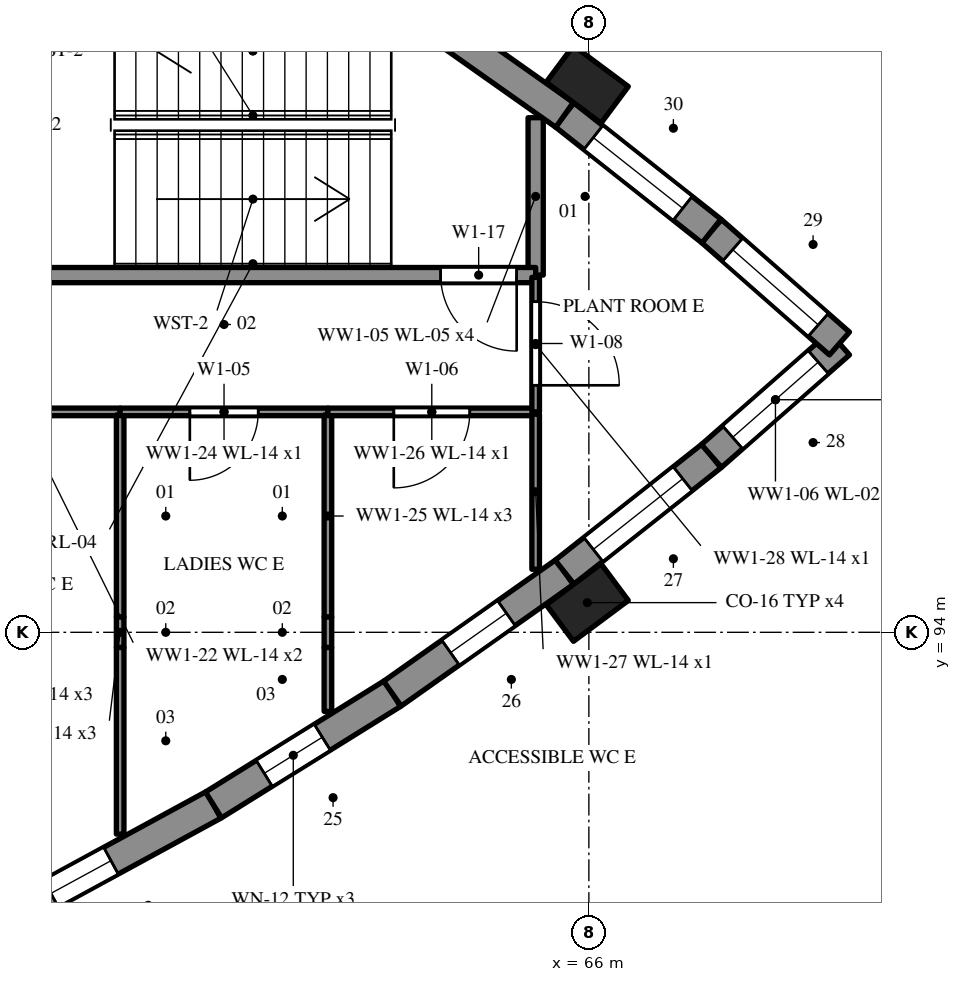
"""IFC4 building model, lengths in metres.
Left out: names, types, materials, properties, quantities, classifications, styles, units other than length and angle.
Written with IfcOpenShell. Run it as: python <this file> out.ifc"""

import sys

from ifc_helpers import new_model, si_unit, direction, frame, frame_2d, origin, origin_2d, place, context, subcontext, project, spatial, rectangle, extrude, element, fill, save


model = new_model("IFC4")
c1 = context("Model", 3, precision=1e-05, world=origin(), true_north=direction((0.0, 1.0)))
c2 = subcontext(c1, "Body", "Model", "MODEL_VIEW")
j1 = project(units=[si_unit("LENGTHUNIT", "METRE"), si_unit("PLANEANGLEUNIT", "RADIAN")], contexts=[c1])
p1 = place(None, origin())
s1 = spatial("IfcSite", under=j1, at=p1, CompositionType="ELEMENT")
p2 = place(p1, origin())
s2 = spatial("IfcBuilding", under=s1, at=p2, CompositionType="ELEMENT")
p3 = place(p2, frame((0.0, 0.0, 5.4)))
s3 = spatial("IfcBuildingStorey", under=s2, at=p3, CompositionType="ELEMENT", Elevation=5.4)
p4 = place(p3, frame((65.3, 100.771, 0.0), z_axis=(0.0, 0.0, 1.0), x_axis=(0.0, -1.0, 0.0)))
e1 = element("IfcWall", 1, at=p4, inside=s3, PredefinedType="SHEAR", context=c2, shape_type="SweptSolid", body=[
    extrude(rectangle(XDim=2.071, YDim=0.2, at=frame_2d((1.035, 0.0))), origin(), (0.0, 0.0, 1.0), 4.8),
])
p5 = place(p3, frame((65.3, 98.7, 0.0), z_axis=(0.0, 0.0, 1.0), x_axis=(-1.0, 0.0, 0.0)))
e2 = element("IfcWall", 2, at=p5, inside=s3, PredefinedType="SHEAR", context=c2, shape_type="SweptSolid", body=[
    extrude(rectangle(XDim=8.2, YDim=0.2, at=frame_2d((4.1, 0.0))), origin(), (0.0, 0.0, 1.0), 4.8),
])
p6 = place(p5, frame((0.25, 0.0, 0.0)))
e3 = element("IfcOpeningElement", 3, at=p6, cuts=e2, PredefinedType="OPENING", context=c2, shape_type="SweptSolid", body=[
    extrude(rectangle(XDim=1.0, YDim=2.4, at=frame_2d((0.5, 1.2))), frame((0.0, 0.11, 0.0), z_axis=(0.0, -1.0, 0.0), x_axis=(1.0, 0.0, 0.0)), (0.0, 0.0, 1.0), 0.22),
])
p7 = place(p3, frame((58.627, 90.404, 0.0), z_axis=(0.0, 0.0, 1.0), x_axis=(0.878292493566, 0.478123724308, 0.0)))
e4 = element("IfcWall", 4, at=p7, inside=s3, PredefinedType="SOLIDWALL", context=c2, shape_type="SweptSolid", body=[
    extrude(rectangle(XDim=2.772, YDim=0.4, at=frame_2d((1.386, 0.0))), origin(), (0.0, 0.0, 1.0), 4.8),
])
p8 = place(p7, frame((0.336, 0.0, 1.6)))
e5 = element("IfcOpeningElement", 5, at=p8, cuts=e4, PredefinedType="OPENING", context=c2, shape_type="SweptSolid", body=[
    extrude(rectangle(XDim=0.9, YDim=0.6, at=frame_2d((0.45, 0.3))), frame((0.0, 0.21, 0.0), z_axis=(0.0, -1.0, 0.0), x_axis=(1.0, 0.0, 0.0)), (0.0, 0.0, 1.0), 0.42),
])
p9 = place(p3, frame((61.062, 91.729, 0.0), z_axis=(0.0, 0.0, 1.0), x_axis=(0.84912946359, 0.528184772653, 0.0)))
e6 = element("IfcWall", 6, at=p9, inside=s3, PredefinedType="SOLIDWALL", context=c2, shape_type="SweptSolid", body=[
    extrude(rectangle(XDim=2.772, YDim=0.4, at=frame_2d((1.386, 0.0))), origin(), (0.0, 0.0, 1.0), 4.8),
])
p10 = place(p9, frame((0.786, 0.0, 1.6)))
e7 = element("IfcOpeningElement", 7, at=p10, cuts=e6, PredefinedType="OPENING", context=c2, shape_type="SweptSolid", body=[
    extrude(rectangle(XDim=0.9, YDim=0.6, at=frame_2d((0.45, 0.3))), frame((0.0, 0.21, 0.0), z_axis=(0.0, -1.0, 0.0), x_axis=(1.0, 0.0, 0.0)), (0.0, 0.0, 1.0), 0.42),
])
p11 = place(p3, frame((63.415, 93.193, 0.0), z_axis=(0.0, 0.0, 1.0), x_axis=(0.817028877428, 0.576596751161, 0.0)))
e8 = element("IfcWall", 8, at=p11, inside=s3, PredefinedType="SOLIDWALL", context=c2, shape_type="SweptSolid", body=[
    extrude(rectangle(XDim=2.772, YDim=0.4, at=frame_2d((1.386, 0.0))), origin(), (0.0, 0.0, 1.0), 4.8),
])
p12 = place(p11, frame((0.936, 0.0, 1.6)))
e9 = element("IfcOpeningElement", 9, at=p12, cuts=e8, PredefinedType="OPENING", context=c2, shape_type="SweptSolid", body=[
    extrude(rectangle(XDim=0.9, YDim=0.6, at=frame_2d((0.45, 0.3))), frame((0.0, 0.21, 0.0), z_axis=(0.0, -1.0, 0.0), x_axis=(1.0, 0.0, 0.0)), (0.0, 0.0, 1.0), 0.42),
])
p13 = place(p3, frame((65.68, 94.792, 0.0), z_axis=(0.0, 0.0, 1.0), x_axis=(0.784278812541, 0.620408530082, 0.0)))
e10 = element("IfcWall", 10, at=p13, inside=s3, PredefinedType="SOLIDWALL", context=c2, shape_type="SweptSolid", body=[
    extrude(rectangle(XDim=2.464, YDim=0.4, at=frame_2d((1.232, 0.0))), origin(), (0.0, 0.0, 1.0), 4.8),
])
p14 = place(p13, frame((0.482, 0.0, 2.4)))
e11 = element("IfcOpeningElement", 11, at=p14, cuts=e10, PredefinedType="OPENING", context=c2, shape_type="SweptSolid", body=[
    extrude(rectangle(XDim=1.5, YDim=0.6, at=frame_2d((0.75, 0.3))), frame((0.0, 0.21, 0.0), z_axis=(0.0, -1.0, 0.0), x_axis=(1.0, 0.0, 0.0)), (0.0, 0.0, 1.0), 0.42),
])
p15 = place(p3, frame((67.613, 96.32, 0.0), z_axis=(0.0, 0.0, 1.0), x_axis=(0.751212351098, 0.660060605973, 0.0)))
e12 = element("IfcWall", 12, at=p15, inside=s3, PredefinedType="SOLIDWALL", context=c2, shape_type="SweptSolid", body=[
    extrude(rectangle(XDim=2.242, YDim=0.4, at=frame_2d((1.121, 0.0))), origin(), (0.0, 0.0, 1.0), 4.8),
])
p16 = place(p15, frame((0.371, 0.0, 2.4)))
e13 = element("IfcOpeningElement", 13, at=p16, cuts=e12, PredefinedType="OPENING", context=c2, shape_type="SweptSolid", body=[
    extrude(rectangle(XDim=1.5, YDim=0.6, at=frame_2d((0.75, 0.3))), frame((0.0, 0.21, 0.0), z_axis=(0.0, -1.0, 0.0), x_axis=(1.0, 0.0, 0.0)), (0.0, 0.0, 1.0), 0.42),
])
p17 = place(p3, frame((69.297, 97.8, 0.0), z_axis=(0.0, 0.0, 1.0), x_axis=(-0.751212351098, 0.660060605973, 0.0)))
e14 = element("IfcWall", 14, at=p17, inside=s3, PredefinedType="SOLIDWALL", context=c2, shape_type="SweptSolid", body=[
    extrude(rectangle(XDim=2.242, YDim=0.4, at=frame_2d((1.121, 0.0))), origin(), (0.0, 0.0, 1.0), 4.8),
])
p18 = place(p17, frame((0.371, 0.0, 2.4)))
e15 = element("IfcOpeningElement", 15, at=p18, cuts=e14, PredefinedType="OPENING", context=c2, shape_type="SweptSolid", body=[
    extrude(rectangle(XDim=1.5, YDim=0.6, at=frame_2d((0.75, 0.3))), frame((0.0, 0.21, 0.0), z_axis=(0.0, -1.0, 0.0), x_axis=(1.0, 0.0, 0.0)), (0.0, 0.0, 1.0), 0.42),
])
p19 = place(p3, frame((67.613, 99.28, 0.0), z_axis=(0.0, 0.0, 1.0), x_axis=(-0.784278812541, 0.620408530082, 0.0)))
e16 = element("IfcWall", 16, at=p19, inside=s3, PredefinedType="SOLIDWALL", context=c2, shape_type="SweptSolid", body=[
    extrude(rectangle(XDim=2.464, YDim=0.4, at=frame_2d((1.232, 0.0))), origin(), (0.0, 0.0, 1.0), 4.8),
])
p20 = place(p19, frame((0.482, 0.0, 2.4)))
e17 = element("IfcOpeningElement", 17, at=p20, cuts=e16, PredefinedType="OPENING", context=c2, shape_type="SweptSolid", body=[
    extrude(rectangle(XDim=1.5, YDim=0.6, at=frame_2d((0.75, 0.3))), frame((0.0, 0.21, 0.0), z_axis=(0.0, -1.0, 0.0), x_axis=(1.0, 0.0, 0.0)), (0.0, 0.0, 1.0), 0.42),
])
p21 = place(p3, frame((65.68, 100.809, 0.0), z_axis=(0.0, 0.0, 1.0), x_axis=(-0.817070367038, 0.57653795652, 0.0)))
e18 = element("IfcWall", 18, at=p21, inside=s3, PredefinedType="SOLIDWALL", context=c2, shape_type="SweptSolid", body=[
    extrude(rectangle(XDim=2.772, YDim=0.4, at=frame_2d((1.386, 0.0))), origin(), (0.0, 0.0, 1.0), 4.8),
])
for number, where, z_axis, x_axis in (
    (19, (65.979, 94.391, 0.0), (0.0, 0.0, 1.0), (0.802, 0.597, 0.0)),
    (20, (65.979, 101.209, 0.0), (0.0, 0.0, 1.0), (-0.802, 0.597, 0.0)),
):
    element("IfcColumn", number, at=place(p3, frame(where, z_axis=z_axis, x_axis=x_axis)), inside=s3, PredefinedType="PILASTER", context=c2, shape_type="SweptSolid", body=[
        extrude(rectangle(XDim=0.9, YDim=0.6, at=origin_2d()), origin(), (0.0, 0.0, 1.0), 4.8),
    ])
p22 = place(p3, frame((59.833, 96.9, 0.0), z_axis=(0.0, 0.0, 1.0), x_axis=(-1.0, 0.0, 0.0)))
e21 = element("IfcWall", 21, at=p22, inside=s3, PredefinedType="PARTITIONING", context=c2, shape_type="SweptSolid", body=[
    extrude(rectangle(XDim=2.658, YDim=0.1, at=frame_2d((1.329, 0.0))), origin(), (0.0, 0.0, 1.0), 4.52),
])
p23 = place(p22, frame((0.917, 0.0, 0.0)))
e22 = element("IfcOpeningElement", 22, at=p23, cuts=e21, PredefinedType="OPENING", context=c2, shape_type="SweptSolid", body=[
    extrude(rectangle(XDim=0.9, YDim=2.1, at=frame_2d((0.45, 1.05))), frame((0.0, 0.06, 0.0), z_axis=(0.0, -1.0, 0.0), x_axis=(1.0, 0.0, 0.0)), (0.0, 0.0, 1.0), 0.12),
])
p24 = place(p3, frame((59.833, 96.86, 0.0), z_axis=(0.0, 0.0, 1.0), x_axis=(0.0, -1.0, 0.0)))
e23 = element("IfcWall", 23, at=p24, inside=s3, PredefinedType="PARTITIONING", context=c2, shape_type="SweptSolid", body=[
    extrude(rectangle(XDim=2.66, YDim=0.1, at=frame_2d((1.33, 0.0))), origin(), (0.0, 0.0, 1.0), 4.52),
])
p25 = place(p3, frame((59.833, 94.2, 0.0), z_axis=(0.0, 0.0, 1.0), x_axis=(0.0, -1.0, 0.0)))
e24 = element("IfcWall", 24, at=p25, inside=s3, PredefinedType="PARTITIONING", context=c2, shape_type="SweptSolid", body=[
    extrude(rectangle(XDim=0.4, YDim=0.1, at=frame_2d((0.2, 0.0))), origin(), (0.0, 0.0, 1.0), 3.72),
])
p26 = place(p3, frame((59.833, 93.8, 0.0), z_axis=(0.0, 0.0, 1.0), x_axis=(0.0, -1.0, 0.0)))
e25 = element("IfcWall", 25, at=p26, inside=s3, PredefinedType="PARTITIONING", context=c2, shape_type="SweptSolid", body=[
    extrude(rectangle(XDim=2.455, YDim=0.1, at=frame_2d((1.228, 0.0))), origin(), (0.0, 0.0, 1.0), 4.52),
])
p27 = place(p3, frame((62.567, 96.9, 0.0), z_axis=(0.0, 0.0, 1.0), x_axis=(-1.0, 0.0, 0.0)))
e26 = element("IfcWall", 26, at=p27, inside=s3, PredefinedType="PARTITIONING", context=c2, shape_type="SweptSolid", body=[
    extrude(rectangle(XDim=2.733, YDim=0.1, at=frame_2d((1.367, 0.0))), origin(), (0.0, 0.0, 1.0), 4.52),
])
p28 = place(p27, frame((0.917, 0.0, 0.0)))
e27 = element("IfcOpeningElement", 27, at=p28, cuts=e26, PredefinedType="OPENING", context=c2, shape_type="SweptSolid", body=[
    extrude(rectangle(XDim=0.9, YDim=2.1, at=frame_2d((0.45, 1.05))), frame((0.0, 0.06, 0.0), z_axis=(0.0, -1.0, 0.0), x_axis=(1.0, 0.0, 0.0)), (0.0, 0.0, 1.0), 0.12),
])
p29 = place(p3, frame((62.567, 96.86, 0.0), z_axis=(0.0, 0.0, 1.0), x_axis=(0.0, -1.0, 0.0)))
e28 = element("IfcWall", 28, at=p29, inside=s3, PredefinedType="PARTITIONING", context=c2, shape_type="SweptSolid", body=[
    extrude(rectangle(XDim=2.66, YDim=0.1, at=frame_2d((1.33, 0.0))), origin(), (0.0, 0.0, 1.0), 4.52),
])
p30 = place(p3, frame((62.567, 94.2, 0.0), z_axis=(0.0, 0.0, 1.0), x_axis=(0.0, -1.0, 0.0)))
e29 = element("IfcWall", 29, at=p30, inside=s3, PredefinedType="PARTITIONING", context=c2, shape_type="SweptSolid", body=[
    extrude(rectangle(XDim=0.4, YDim=0.1, at=frame_2d((0.2, 0.0))), origin(), (0.0, 0.0, 1.0), 3.72),
])
p31 = place(p3, frame((62.567, 93.8, 0.0), z_axis=(0.0, 0.0, 1.0), x_axis=(0.0, -1.0, 0.0)))
e30 = element("IfcWall", 30, at=p31, inside=s3, PredefinedType="PARTITIONING", context=c2, shape_type="SweptSolid", body=[
    extrude(rectangle(XDim=0.84, YDim=0.1, at=frame_2d((0.42, 0.0))), origin(), (0.0, 0.0, 1.0), 4.52),
])
p32 = place(p3, frame((65.3, 96.9, 0.0), z_axis=(0.0, 0.0, 1.0), x_axis=(-1.0, 0.0, 0.0)))
e31 = element("IfcWall", 31, at=p32, inside=s3, PredefinedType="PARTITIONING", context=c2, shape_type="SweptSolid", body=[
    extrude(rectangle(XDim=2.733, YDim=0.1, at=frame_2d((1.367, 0.0))), origin(), (0.0, 0.0, 1.0), 4.52),
])
p33 = place(p32, frame((0.867, 0.0, 0.0)))
e32 = element("IfcOpeningElement", 32, at=p33, cuts=e31, PredefinedType="OPENING", context=c2, shape_type="SweptSolid", body=[
    extrude(rectangle(XDim=1.0, YDim=2.1, at=frame_2d((0.5, 1.05))), frame((0.0, 0.06, 0.0), z_axis=(0.0, -1.0, 0.0), x_axis=(1.0, 0.0, 0.0)), (0.0, 0.0, 1.0), 0.12),
])
p34 = place(p3, frame((65.3, 96.87, 0.0), z_axis=(0.0, 0.0, 1.0), x_axis=(0.0, -1.0, 0.0)))
e33 = element("IfcWall", 33, at=p34, inside=s3, PredefinedType="PARTITIONING", context=c2, shape_type="SweptSolid", body=[
    extrude(rectangle(XDim=2.041, YDim=0.1, at=frame_2d((1.021, 0.0))), origin(), (0.0, 0.0, 1.0), 4.52),
])
p35 = place(p3, frame((65.3, 98.67, 0.0), z_axis=(0.0, 0.0, 1.0), x_axis=(0.0, -1.0, 0.0)))
e34 = element("IfcWall", 34, at=p35, inside=s3, PredefinedType="PARTITIONING", context=c2, shape_type="SweptSolid", body=[
    extrude(rectangle(XDim=1.77, YDim=0.1, at=frame_2d((0.885, 0.0))), origin(), (0.0, 0.0, 1.0), 4.52),
])
p36 = place(p35, frame((0.32, 0.0, 0.0)))
e35 = element("IfcOpeningElement", 35, at=p36, cuts=e34, PredefinedType="OPENING", context=c2, shape_type="SweptSolid", body=[
    extrude(rectangle(XDim=1.1, YDim=2.1, at=frame_2d((0.55, 1.05))), frame((0.0, 0.06, 0.0), z_axis=(0.0, -1.0, 0.0), x_axis=(1.0, 0.0, 0.0)), (0.0, 0.0, 1.0), 0.12),
])
p37 = place(p8, origin())
e36 = element("IfcWindow", 36, at=p37, inside=s3, PartitioningType="SINGLE_PANEL", PredefinedType="WINDOW", context=c2, shape_type="SweptSolid", body=[
    extrude(rectangle(XDim=0.9, YDim=0.6, at=frame_2d((0.45, 0.3))), frame((0.0, 0.03, 0.0), z_axis=(0.0, -1.0, 0.0), x_axis=(1.0, 0.0, 0.0)), (0.0, 0.0, 1.0), 0.06),
])
fill(e5, e36)
p38 = place(p10, origin())
e37 = element("IfcWindow", 37, at=p38, inside=s3, PartitioningType="SINGLE_PANEL", PredefinedType="WINDOW", context=c2, shape_type="SweptSolid", body=[
    extrude(rectangle(XDim=0.9, YDim=0.6, at=frame_2d((0.45, 0.3))), frame((0.0, 0.03, 0.0), z_axis=(0.0, -1.0, 0.0), x_axis=(1.0, 0.0, 0.0)), (0.0, 0.0, 1.0), 0.06),
])
fill(e7, e37)
p39 = place(p12, origin())
e38 = element("IfcWindow", 38, at=p39, inside=s3, PartitioningType="SINGLE_PANEL", PredefinedType="WINDOW", context=c2, shape_type="SweptSolid", body=[
    extrude(rectangle(XDim=0.9, YDim=0.6, at=frame_2d((0.45, 0.3))), frame((0.0, 0.03, 0.0), z_axis=(0.0, -1.0, 0.0), x_axis=(1.0, 0.0, 0.0)), (0.0, 0.0, 1.0), 0.06),
])
fill(e9, e38)
p40 = place(p14, origin())
e39 = element("IfcWindow", 39, at=p40, inside=s3, PartitioningType="SINGLE_PANEL", PredefinedType="WINDOW", context=c2, shape_type="SweptSolid", body=[
    extrude(rectangle(XDim=1.5, YDim=0.6, at=frame_2d((0.75, 0.3))), frame((0.0, 0.03, 0.0), z_axis=(0.0, -1.0, 0.0), x_axis=(1.0, 0.0, 0.0)), (0.0, 0.0, 1.0), 0.06),
])
fill(e11, e39)
p41 = place(p16, origin())
e40 = element("IfcWindow", 40, at=p41, inside=s3, PartitioningType="SINGLE_PANEL", PredefinedType="WINDOW", context=c2, shape_type="SweptSolid", body=[
    extrude(rectangle(XDim=1.5, YDim=0.6, at=frame_2d((0.75, 0.3))), frame((0.0, 0.03, 0.0), z_axis=(0.0, -1.0, 0.0), x_axis=(1.0, 0.0, 0.0)), (0.0, 0.0, 1.0), 0.06),
])
fill(e13, e40)
p42 = place(p18, origin())
e41 = element("IfcWindow", 41, at=p42, inside=s3, PartitioningType="SINGLE_PANEL", PredefinedType="WINDOW", context=c2, shape_type="SweptSolid", body=[
    extrude(rectangle(XDim=1.5, YDim=0.6, at=frame_2d((0.75, 0.3))), frame((0.0, 0.03, 0.0), z_axis=(0.0, -1.0, 0.0), x_axis=(1.0, 0.0, 0.0)), (0.0, 0.0, 1.0), 0.06),
])
fill(e15, e41)
p43 = place(p20, origin())
e42 = element("IfcWindow", 42, at=p43, inside=s3, PartitioningType="SINGLE_PANEL", PredefinedType="WINDOW", context=c2, shape_type="SweptSolid", body=[
    extrude(rectangle(XDim=1.5, YDim=0.6, at=frame_2d((0.75, 0.3))), frame((0.0, 0.03, 0.0), z_axis=(0.0, -1.0, 0.0), x_axis=(1.0, 0.0, 0.0)), (0.0, 0.0, 1.0), 0.06),
])
fill(e17, e42)
p44 = place(p28, origin())
e43 = element("IfcDoor", 43, at=p44, inside=s3, OperationType="SINGLE_SWING_RIGHT", PredefinedType="DOOR", context=c2, shape_type="SweptSolid", body=[
    extrude(rectangle(XDim=0.9, YDim=2.1, at=frame_2d((0.45, 1.05))), frame((0.0, 0.025, 0.0), z_axis=(0.0, -1.0, 0.0), x_axis=(1.0, 0.0, 0.0)), (0.0, 0.0, 1.0), 0.05),
])
fill(e27, e43)
p45 = place(p33, origin())
e44 = element("IfcDoor", 44, at=p45, inside=s3, OperationType="SINGLE_SWING_RIGHT", PredefinedType="DOOR", context=c2, shape_type="SweptSolid", body=[
    extrude(rectangle(XDim=1.0, YDim=2.1, at=frame_2d((0.5, 1.05))), frame((0.0, 0.025, 0.0), z_axis=(0.0, -1.0, 0.0), x_axis=(1.0, 0.0, 0.0)), (0.0, 0.0, 1.0), 0.05),
])
fill(e32, e44)
p46 = place(p36, origin())
e45 = element("IfcDoor", 45, at=p46, inside=s3, OperationType="SINGLE_SWING_RIGHT", PredefinedType="DOOR", context=c2, shape_type="SweptSolid", body=[
    extrude(rectangle(XDim=1.1, YDim=2.1, at=frame_2d((0.55, 1.05))), frame((0.0, 0.025, 0.0), z_axis=(0.0, -1.0, 0.0), x_axis=(1.0, 0.0, 0.0)), (0.0, 0.0, 1.0), 0.05),
])
fill(e35, e45)
p47 = place(p6, origin())
e46 = element("IfcDoor", 46, at=p47, inside=s3, OperationType="SINGLE_SWING_LEFT", PredefinedType="DOOR", context=c2, shape_type="SweptSolid", body=[
    extrude(rectangle(XDim=1.0, YDim=2.4, at=frame_2d((0.5, 1.2))), frame((0.0, 0.025, 0.0), z_axis=(0.0, -1.0, 0.0), x_axis=(1.0, 0.0, 0.0)), (0.0, 0.0, 1.0), 0.05),
])
fill(e3, e46)
save(model, sys.argv[1])
